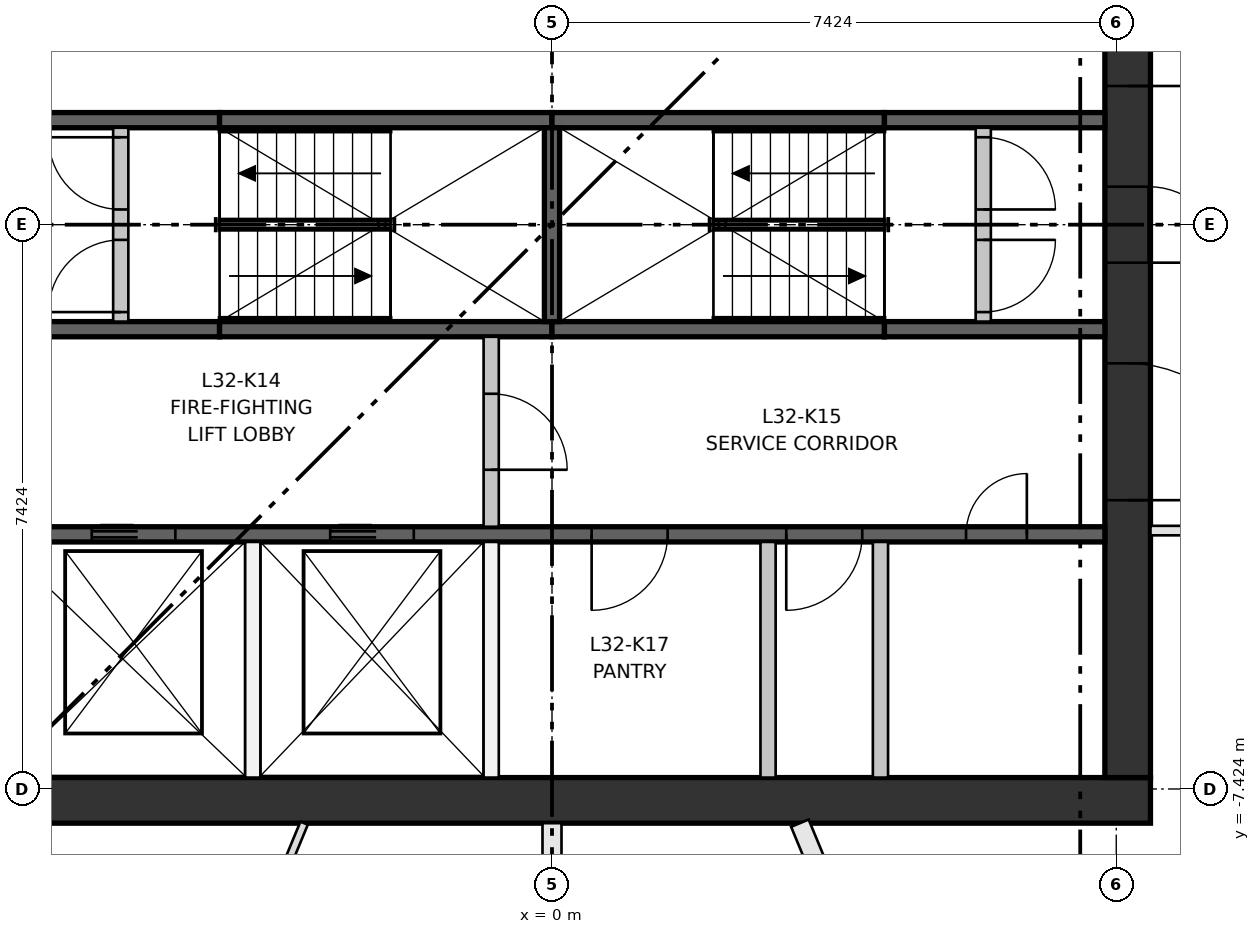
"""IFC4 building model, lengths in metres.
Left out: names, types, materials, properties, quantities, classifications, styles, units other than length and angle.
Written with IfcOpenShell. Run it as: python <this file> out.ifc"""

import sys

from ifc_helpers import new_model, si_unit, direction, frame, frame_2d, origin, place, context, subcontext, project, spatial, rectangle, extrude, element, fill, save


model = new_model("IFC4")
c1 = context("Model", 3, precision=1e-05, world=origin(), true_north=direction((0.0, 1.0)))
c2 = subcontext(c1, "Body", "Model", "MODEL_VIEW")
j1 = project(units=[si_unit("LENGTHUNIT", "METRE"), si_unit("PLANEANGLEUNIT", "RADIAN")], contexts=[c1])
p1 = place(None, origin())
s1 = spatial("IfcSite", under=j1, at=p1, CompositionType="ELEMENT")
p2 = place(p1, origin())
s2 = spatial("IfcBuilding", under=s1, at=p2, CompositionType="ELEMENT")
p3 = place(p2, frame((0.0, 0.0, 124.3)))
s3 = spatial("IfcBuildingStorey", under=s2, at=p3, CompositionType="ELEMENT", Elevation=124.3)
p4 = place(p3, frame((-7.874, -7.574, 0.0), z_axis=(0.0, 0.0, 1.0), x_axis=(1.0, 0.0, 0.0)))
e1 = element("IfcWall", 1, at=p4, inside=s3, PredefinedType="SHEAR", context=c2, shape_type="SweptSolid", body=[
    extrude(rectangle(XDim=15.748, YDim=0.6, at=frame_2d((7.874, 0.0))), origin(), (0.0, 0.0, 1.0), 3.35),
])
p5 = place(p3, frame((7.574, -7.274, 0.0), z_axis=(0.0, 0.0, 1.0), x_axis=(0.0, 1.0, 0.0)))
e2 = element("IfcWall", 2, at=p5, inside=s3, PredefinedType="SHEAR", context=c2, shape_type="SweptSolid", body=[
    extrude(rectangle(XDim=14.548, YDim=0.6, at=frame_2d((7.274, 0.0))), origin(), (0.0, 0.0, 1.0), 3.35),
])
p6 = place(p5, frame((6.774, 0.0, 0.0)))
e3 = element("IfcOpeningElement", 3, at=p6, cuts=e2, PredefinedType="OPENING", context=c2, shape_type="SweptSolid", body=[
    extrude(rectangle(XDim=1.0, YDim=2.1, at=frame_2d((0.5, 1.05))), frame((0.0, 0.31, 0.0), z_axis=(0.0, -1.0, 0.0), x_axis=(1.0, 0.0, 0.0)), (0.0, 0.0, 1.0), 0.62),
])
p7 = place(p5, frame((3.649, 0.0, 0.0)))
e4 = element("IfcOpeningElement", 4, at=p7, cuts=e2, PredefinedType="OPENING", context=c2, shape_type="SweptSolid", body=[
    extrude(rectangle(XDim=1.8, YDim=2.1, at=frame_2d((0.9, 1.05))), frame((0.0, 0.31, 0.0), z_axis=(0.0, -1.0, 0.0), x_axis=(1.0, 0.0, 0.0)), (0.0, 0.0, 1.0), 0.62),
])
p8 = place(p5, frame((9.098, 0.0, 0.0)))
e5 = element("IfcOpeningElement", 5, at=p8, cuts=e2, PredefinedType="OPENING", context=c2, shape_type="SweptSolid", body=[
    extrude(rectangle(XDim=1.8, YDim=2.1, at=frame_2d((0.9, 1.05))), frame((0.0, 0.31, 0.0), z_axis=(0.0, -1.0, 0.0), x_axis=(1.0, 0.0, 0.0)), (0.0, 0.0, 1.0), 0.62),
])
p9 = place(p3, frame((-7.274, -4.074, 0.0), z_axis=(0.0, 0.0, 1.0), x_axis=(1.0, 0.0, 0.0)))
e6 = element("IfcWall", 6, at=p9, inside=s3, PredefinedType="SHEAR", context=c2, shape_type="SweptSolid", body=[
    extrude(rectangle(XDim=14.548, YDim=0.2, at=frame_2d((7.274, 0.0))), origin(), (0.0, 0.0, 1.0), 3.0),
])
p10 = place(p9, frame((1.219, 0.0, 0.0)))
e7 = element("IfcOpeningElement", 7, at=p10, cuts=e6, PredefinedType="OPENING", context=c2, shape_type="SweptSolid", body=[
    extrude(rectangle(XDim=1.1, YDim=2.1, at=frame_2d((0.55, 1.05))), frame((0.0, 0.11, 0.0), z_axis=(0.0, -1.0, 0.0), x_axis=(1.0, 0.0, 0.0)), (0.0, 0.0, 1.0), 0.22),
])
p11 = place(p9, frame((4.355, 0.0, 0.0)))
e8 = element("IfcOpeningElement", 8, at=p11, cuts=e6, PredefinedType="OPENING", context=c2, shape_type="SweptSolid", body=[
    extrude(rectangle(XDim=1.1, YDim=2.1, at=frame_2d((0.55, 1.05))), frame((0.0, 0.11, 0.0), z_axis=(0.0, -1.0, 0.0), x_axis=(1.0, 0.0, 0.0)), (0.0, 0.0, 1.0), 0.22),
])
p12 = place(p9, frame((7.795, 0.0, 0.0)))
e9 = element("IfcOpeningElement", 9, at=p12, cuts=e6, PredefinedType="OPENING", context=c2, shape_type="SweptSolid", body=[
    extrude(rectangle(XDim=1.0, YDim=2.1, at=frame_2d((0.5, 1.05))), frame((0.0, 0.11, 0.0), z_axis=(0.0, -1.0, 0.0), x_axis=(1.0, 0.0, 0.0)), (0.0, 0.0, 1.0), 0.22),
])
p13 = place(p9, frame((10.356, 0.0, 0.0)))
e10 = element("IfcOpeningElement", 10, at=p13, cuts=e6, PredefinedType="OPENING", context=c2, shape_type="SweptSolid", body=[
    extrude(rectangle(XDim=1.0, YDim=2.1, at=frame_2d((0.5, 1.05))), frame((0.0, 0.11, 0.0), z_axis=(0.0, -1.0, 0.0), x_axis=(1.0, 0.0, 0.0)), (0.0, 0.0, 1.0), 0.22),
])
p14 = place(p9, frame((12.722, 0.0, 0.0)))
e11 = element("IfcOpeningElement", 11, at=p14, cuts=e6, PredefinedType="OPENING", context=c2, shape_type="SweptSolid", body=[
    extrude(rectangle(XDim=0.8, YDim=2.1, at=frame_2d((0.4, 1.05))), frame((0.0, 0.11, 0.0), z_axis=(0.0, -1.0, 0.0), x_axis=(1.0, 0.0, 0.0)), (0.0, 0.0, 1.0), 0.22),
])
p15 = place(p3, frame((-7.274, -1.375, 0.0), z_axis=(0.0, 0.0, 1.0), x_axis=(1.0, 0.0, 0.0)))
e12 = element("IfcWall", 12, at=p15, inside=s3, PredefinedType="SHEAR", context=c2, shape_type="SweptSolid", body=[
    extrude(rectangle(XDim=2.9, YDim=0.2, at=frame_2d((1.45, 0.0))), origin(), (0.0, 0.0, 1.0), 3.0),
])
for number, where, z_axis, x_axis in (
    (13, (-4.374, -1.375, 0.0), (0.0, 0.0, 1.0), (1.0, 0.0, 0.0)),
    (14, (0.0, -1.375, 0.0), (0.0, 0.0, 1.0), (1.0, 0.0, 0.0)),
):
    element("IfcWall", number, at=place(p3, frame(where, z_axis=z_axis, x_axis=x_axis)), inside=s3, PredefinedType="SHEAR", context=c2, shape_type="SweptSolid", body=[
        extrude(rectangle(XDim=4.374, YDim=0.2, at=frame_2d((2.187, 0.0))), origin(), (0.0, 0.0, 1.0), 3.0),
    ])
for number, where, z_axis, x_axis in (
    (15, (4.374, -1.375, 0.0), (0.0, 0.0, 1.0), (1.0, 0.0, 0.0)),
    (16, (-7.274, 1.375, 0.0), (0.0, 0.0, 1.0), (1.0, 0.0, 0.0)),
):
    element("IfcWall", number, at=place(p3, frame(where, z_axis=z_axis, x_axis=x_axis)), inside=s3, PredefinedType="SHEAR", context=c2, shape_type="SweptSolid", body=[
        extrude(rectangle(XDim=2.9, YDim=0.2, at=frame_2d((1.45, 0.0))), origin(), (0.0, 0.0, 1.0), 3.0),
    ])
for number, where, z_axis, x_axis in (
    (17, (-4.374, 1.375, 0.0), (0.0, 0.0, 1.0), (1.0, 0.0, 0.0)),
    (18, (0.0, 1.375, 0.0), (0.0, 0.0, 1.0), (1.0, 0.0, 0.0)),
):
    element("IfcWall", number, at=place(p3, frame(where, z_axis=z_axis, x_axis=x_axis)), inside=s3, PredefinedType="SHEAR", context=c2, shape_type="SweptSolid", body=[
        extrude(rectangle(XDim=4.374, YDim=0.2, at=frame_2d((2.187, 0.0))), origin(), (0.0, 0.0, 1.0), 3.0),
    ])
p16 = place(p3, frame((4.374, 1.375, 0.0), z_axis=(0.0, 0.0, 1.0), x_axis=(1.0, 0.0, 0.0)))
e19 = element("IfcWall", 19, at=p16, inside=s3, PredefinedType="SHEAR", context=c2, shape_type="SweptSolid", body=[
    extrude(rectangle(XDim=2.9, YDim=0.2, at=frame_2d((1.45, 0.0))), origin(), (0.0, 0.0, 1.0), 3.0),
])
p17 = place(p3, frame((0.0, -1.275, 0.0), z_axis=(0.0, 0.0, 1.0), x_axis=(0.0, 1.0, 0.0)))
e20 = element("IfcWall", 20, at=p17, inside=s3, PredefinedType="SHEAR", context=c2, shape_type="SweptSolid", body=[
    extrude(rectangle(XDim=2.55, YDim=0.2, at=frame_2d((1.275, 0.0))), origin(), (0.0, 0.0, 1.0), 3.0),
])
for number, where, z_axis, x_axis in (
    (21, (-3.937, -7.274, 0.0), (0.0, 0.0, 1.0), (0.0, 1.0, 0.0)),
    (22, (-0.8, -7.274, 0.0), (0.0, 0.0, 1.0), (0.0, 1.0, 0.0)),
):
    element("IfcWall", number, at=place(p3, frame(where, z_axis=z_axis, x_axis=x_axis)), inside=s3, PredefinedType="PARTITIONING", context=c2, shape_type="SweptSolid", body=[
        extrude(rectangle(XDim=3.1, YDim=0.2, at=frame_2d((1.55, 0.0))), origin(), (0.0, 0.0, 1.0), 3.0),
    ])
p18 = place(p3, frame((-0.8, -3.974, 0.0), z_axis=(0.0, 0.0, 1.0), x_axis=(0.0, 1.0, 0.0)))
e23 = element("IfcWall", 23, at=p18, inside=s3, PredefinedType="PARTITIONING", context=c2, shape_type="SweptSolid", body=[
    extrude(rectangle(XDim=2.499, YDim=0.2, at=frame_2d((1.25, 0.0))), origin(), (0.0, 0.0, 1.0), 3.0),
])
p19 = place(p18, frame((0.75, 0.0, 0.0)))
e24 = element("IfcOpeningElement", 24, at=p19, cuts=e23, PredefinedType="OPENING", context=c2, shape_type="SweptSolid", body=[
    extrude(rectangle(XDim=1.0, YDim=2.1, at=frame_2d((0.5, 1.05))), frame((0.0, 0.11, 0.0), z_axis=(0.0, -1.0, 0.0), x_axis=(1.0, 0.0, 0.0)), (0.0, 0.0, 1.0), 0.22),
])
for number, where, z_axis, x_axis in (
    (25, (2.843, -7.274, 0.0), (0.0, 0.0, 1.0), (0.0, 1.0, 0.0)),
    (26, (4.322, -7.274, 0.0), (0.0, 0.0, 1.0), (0.0, 1.0, 0.0)),
):
    element("IfcWall", number, at=place(p3, frame(where, z_axis=z_axis, x_axis=x_axis)), inside=s3, PredefinedType="PARTITIONING", context=c2, shape_type="SweptSolid", body=[
        extrude(rectangle(XDim=3.1, YDim=0.2, at=frame_2d((1.55, 0.0))), origin(), (0.0, 0.0, 1.0), 3.0),
    ])
p20 = place(p3, frame((-5.674, -1.275, 0.0), z_axis=(0.0, 0.0, 1.0), x_axis=(0.0, 1.0, 0.0)))
e27 = element("IfcWall", 27, at=p20, inside=s3, PredefinedType="PARTITIONING", context=c2, shape_type="SweptSolid", body=[
    extrude(rectangle(XDim=2.55, YDim=0.2, at=frame_2d((1.275, 0.0))), origin(), (0.0, 0.0, 1.0), 3.0),
])
p21 = place(p20, frame((0.125, 0.0, 0.0)))
e28 = element("IfcOpeningElement", 28, at=p21, cuts=e27, PredefinedType="OPENING", context=c2, shape_type="SweptSolid", body=[
    extrude(rectangle(XDim=0.95, YDim=2.1, at=frame_2d((0.475, 1.05))), frame((0.0, 0.11, 0.0), z_axis=(0.0, -1.0, 0.0), x_axis=(1.0, 0.0, 0.0)), (0.0, 0.0, 1.0), 0.22),
])
p22 = place(p20, frame((1.475, 0.0, 0.0)))
e29 = element("IfcOpeningElement", 29, at=p22, cuts=e27, PredefinedType="OPENING", context=c2, shape_type="SweptSolid", body=[
    extrude(rectangle(XDim=0.95, YDim=2.1, at=frame_2d((0.475, 1.05))), frame((0.0, 0.11, 0.0), z_axis=(0.0, -1.0, 0.0), x_axis=(1.0, 0.0, 0.0)), (0.0, 0.0, 1.0), 0.22),
])
p23 = place(p3, frame((5.674, -1.275, 0.0), z_axis=(0.0, 0.0, 1.0), x_axis=(0.0, 1.0, 0.0)))
e30 = element("IfcWall", 30, at=p23, inside=s3, PredefinedType="PARTITIONING", context=c2, shape_type="SweptSolid", body=[
    extrude(rectangle(XDim=2.55, YDim=0.2, at=frame_2d((1.275, 0.0))), origin(), (0.0, 0.0, 1.0), 3.0),
])
p24 = place(p23, frame((0.125, 0.0, 0.0)))
e31 = element("IfcOpeningElement", 31, at=p24, cuts=e30, PredefinedType="OPENING", context=c2, shape_type="SweptSolid", body=[
    extrude(rectangle(XDim=0.95, YDim=2.1, at=frame_2d((0.475, 1.05))), frame((0.0, 0.11, 0.0), z_axis=(0.0, -1.0, 0.0), x_axis=(1.0, 0.0, 0.0)), (0.0, 0.0, 1.0), 0.22),
])
p25 = place(p23, frame((1.475, 0.0, 0.0)))
e32 = element("IfcOpeningElement", 32, at=p25, cuts=e30, PredefinedType="OPENING", context=c2, shape_type="SweptSolid", body=[
    extrude(rectangle(XDim=0.95, YDim=2.1, at=frame_2d((0.475, 1.05))), frame((0.0, 0.11, 0.0), z_axis=(0.0, -1.0, 0.0), x_axis=(1.0, 0.0, 0.0)), (0.0, 0.0, 1.0), 0.22),
])
p26 = place(p3, frame((13.258, -4.024, 0.0), z_axis=(0.0, 0.0, 1.0), x_axis=(-1.0, 0.0, 0.0)))
e33 = element("IfcWall", 33, at=p26, inside=s3, PredefinedType="PARTITIONING", context=c2, shape_type="SweptSolid", body=[
    extrude(rectangle(XDim=5.384, YDim=0.125, at=frame_2d((2.692, 0.0))), origin(), (0.0, 0.0, 1.0), 3.0),
])
p27 = place(p26, frame((1.8, 0.0, 0.0)))
e34 = element("IfcOpeningElement", 34, at=p27, cuts=e33, PredefinedType="OPENING", context=c2, shape_type="SweptSolid", body=[
    extrude(rectangle(XDim=1.8, YDim=2.1, at=frame_2d((0.9, 1.05))), frame((0.0, 0.073, 0.0), z_axis=(0.0, -1.0, 0.0), x_axis=(1.0, 0.0, 0.0)), (0.0, 0.0, 1.0), 0.145),
])
p28 = place(p3, frame((-3.261, -7.874, 0.0), z_axis=(0.0, 0.0, 1.0), x_axis=(-0.382671840259, -0.923884334034, 0.0)))
e35 = element("IfcWall", 35, at=p28, inside=s3, PredefinedType="PARTITIONING", context=c2, shape_type="SweptSolid", body=[
    extrude(rectangle(XDim=6.737, YDim=0.105, at=frame_2d((3.369, 0.0))), origin(), (0.0, 0.0, 1.0), 3.0),
])
p29 = place(p3, frame((0.0, -7.874, 0.0), z_axis=(0.0, 0.0, 1.0), x_axis=(0.0, -1.0, 0.0)))
e36 = element("IfcWall", 36, at=p29, inside=s3, PredefinedType="PARTITIONING", context=c2, shape_type="SweptSolid", body=[
    extrude(rectangle(XDim=7.255, YDim=0.25, at=frame_2d((3.627, 0.0))), origin(), (0.0, 0.0, 1.0), 3.0),
])
p30 = place(p3, frame((5.84, -14.098, 0.0), z_axis=(0.0, 0.0, 1.0), x_axis=(-0.382671840259, 0.923884334034, 0.0)))
e37 = element("IfcWall", 37, at=p30, inside=s3, PredefinedType="PARTITIONING", context=c2, shape_type="SweptSolid", body=[
    extrude(rectangle(XDim=6.737, YDim=0.25, at=frame_2d((3.369, 0.0))), origin(), (0.0, 0.0, 1.0), 3.0),
])
p31 = place(p30, frame((2.9, 0.0, 0.0)))
e38 = element("IfcOpeningElement", 38, at=p31, cuts=e37, PredefinedType="OPENING", context=c2, shape_type="SweptSolid", body=[
    extrude(rectangle(XDim=1.0, YDim=2.1, at=frame_2d((0.5, 1.05))), frame((0.0, 0.135, 0.0), z_axis=(0.0, -1.0, 0.0), x_axis=(1.0, 0.0, 0.0)), (0.0, 0.0, 1.0), 0.27),
])
p32 = place(p10, origin())
e39 = element("IfcDoor", 39, at=p32, inside=s3, OperationType="DOUBLE_DOOR_SLIDING", PredefinedType="DOOR", context=c2, shape_type="SweptSolid", body=[
    extrude(rectangle(XDim=1.1, YDim=2.1, at=frame_2d((0.55, 1.05))), frame((0.0, 0.025, 0.0), z_axis=(0.0, -1.0, 0.0), x_axis=(1.0, 0.0, 0.0)), (0.0, 0.0, 1.0), 0.05),
])
fill(e7, e39)
p33 = place(p11, origin())
e40 = element("IfcDoor", 40, at=p33, inside=s3, OperationType="DOUBLE_DOOR_SLIDING", PredefinedType="DOOR", context=c2, shape_type="SweptSolid", body=[
    extrude(rectangle(XDim=1.1, YDim=2.1, at=frame_2d((0.55, 1.05))), frame((0.0, 0.025, 0.0), z_axis=(0.0, -1.0, 0.0), x_axis=(1.0, 0.0, 0.0)), (0.0, 0.0, 1.0), 0.05),
])
fill(e8, e40)
p34 = place(p21, origin())
e41 = element("IfcDoor", 41, at=p34, inside=s3, OperationType="SINGLE_SWING_LEFT", PredefinedType="DOOR", context=c2, shape_type="SweptSolid", body=[
    extrude(rectangle(XDim=0.95, YDim=2.1, at=frame_2d((0.475, 1.05))), frame((0.0, 0.025, 0.0), z_axis=(0.0, -1.0, 0.0), x_axis=(1.0, 0.0, 0.0)), (0.0, 0.0, 1.0), 0.05),
])
fill(e28, e41)
p35 = place(p22, origin())
e42 = element("IfcDoor", 42, at=p35, inside=s3, OperationType="SINGLE_SWING_RIGHT", PredefinedType="DOOR", context=c2, shape_type="SweptSolid", body=[
    extrude(rectangle(XDim=0.95, YDim=2.1, at=frame_2d((0.475, 1.05))), frame((0.0, 0.025, 0.0), z_axis=(0.0, -1.0, 0.0), x_axis=(1.0, 0.0, 0.0)), (0.0, 0.0, 1.0), 0.05),
])
fill(e29, e42)
p36 = place(p24, frame((0.95, 0.0, 0.0), z_axis=(0.0, 0.0, 1.0), x_axis=(-1.0, 0.0, 0.0)))
e43 = element("IfcDoor", 43, at=p36, inside=s3, OperationType="SINGLE_SWING_RIGHT", PredefinedType="DOOR", context=c2, shape_type="SweptSolid", body=[
    extrude(rectangle(XDim=0.95, YDim=2.1, at=frame_2d((0.475, 1.05))), frame((0.0, 0.025, 0.0), z_axis=(0.0, -1.0, 0.0), x_axis=(1.0, 0.0, 0.0)), (0.0, 0.0, 1.0), 0.05),
])
fill(e31, e43)
p37 = place(p25, frame((0.95, 0.0, 0.0), z_axis=(0.0, 0.0, 1.0), x_axis=(-1.0, 0.0, 0.0)))
e44 = element("IfcDoor", 44, at=p37, inside=s3, OperationType="SINGLE_SWING_LEFT", PredefinedType="DOOR", context=c2, shape_type="SweptSolid", body=[
    extrude(rectangle(XDim=0.95, YDim=2.1, at=frame_2d((0.475, 1.05))), frame((0.0, 0.025, 0.0), z_axis=(0.0, -1.0, 0.0), x_axis=(1.0, 0.0, 0.0)), (0.0, 0.0, 1.0), 0.05),
])
fill(e32, e44)
p38 = place(p19, frame((1.0, 0.0, 0.0), z_axis=(0.0, 0.0, 1.0), x_axis=(-1.0, 0.0, 0.0)))
e45 = element("IfcDoor", 45, at=p38, inside=s3, OperationType="SINGLE_SWING_LEFT", PredefinedType="DOOR", context=c2, shape_type="SweptSolid", body=[
    extrude(rectangle(XDim=1.0, YDim=2.1, at=frame_2d((0.5, 1.05))), frame((0.0, 0.025, 0.0), z_axis=(0.0, -1.0, 0.0), x_axis=(1.0, 0.0, 0.0)), (0.0, 0.0, 1.0), 0.05),
])
fill(e24, e45)
p39 = place(p12, frame((1.0, 0.0, 0.0), z_axis=(0.0, 0.0, 1.0), x_axis=(-1.0, 0.0, 0.0)))
e46 = element("IfcDoor", 46, at=p39, inside=s3, OperationType="SINGLE_SWING_LEFT", PredefinedType="DOOR", context=c2, shape_type="SweptSolid", body=[
    extrude(rectangle(XDim=1.0, YDim=2.1, at=frame_2d((0.5, 1.05))), frame((0.0, 0.025, 0.0), z_axis=(0.0, -1.0, 0.0), x_axis=(1.0, 0.0, 0.0)), (0.0, 0.0, 1.0), 0.05),
])
fill(e9, e46)
p40 = place(p13, frame((1.0, 0.0, 0.0), z_axis=(0.0, 0.0, 1.0), x_axis=(-1.0, 0.0, 0.0)))
e47 = element("IfcDoor", 47, at=p40, inside=s3, OperationType="SINGLE_SWING_LEFT", PredefinedType="DOOR", context=c2, shape_type="SweptSolid", body=[
    extrude(rectangle(XDim=1.0, YDim=2.1, at=frame_2d((0.5, 1.05))), frame((0.0, 0.025, 0.0), z_axis=(0.0, -1.0, 0.0), x_axis=(1.0, 0.0, 0.0)), (0.0, 0.0, 1.0), 0.05),
])
fill(e10, e47)
p41 = place(p14, origin())
e48 = element("IfcDoor", 48, at=p41, inside=s3, OperationType="SINGLE_SWING_RIGHT", PredefinedType="DOOR", context=c2, shape_type="SweptSolid", body=[
    extrude(rectangle(XDim=0.8, YDim=2.1, at=frame_2d((0.4, 1.05))), frame((0.0, 0.025, 0.0), z_axis=(0.0, -1.0, 0.0), x_axis=(1.0, 0.0, 0.0)), (0.0, 0.0, 1.0), 0.05),
])
fill(e11, e48)
p42 = place(p6, frame((1.0, 0.0, 0.0), z_axis=(0.0, 0.0, 1.0), x_axis=(-1.0, 0.0, 0.0)))
e49 = element("IfcDoor", 49, at=p42, inside=s3, OperationType="SINGLE_SWING_LEFT", PredefinedType="DOOR", context=c2, shape_type="SweptSolid", body=[
    extrude(rectangle(XDim=1.0, YDim=2.1, at=frame_2d((0.5, 1.05))), frame((0.0, 0.3, 0.0), z_axis=(0.0, -1.0, 0.0), x_axis=(1.0, 0.0, 0.0)), (0.0, 0.0, 1.0), 0.05),
])
fill(e3, e49)
p43 = place(p7, frame((1.8, 0.0, 0.0), z_axis=(0.0, 0.0, 1.0), x_axis=(-1.0, 0.0, 0.0)))
e50 = element("IfcDoor", 50, at=p43, inside=s3, OperationType="DOUBLE_DOOR_SINGLE_SWING", PredefinedType="DOOR", context=c2, shape_type="SweptSolid", body=[
    extrude(rectangle(XDim=1.8, YDim=2.1, at=frame_2d((0.9, 1.05))), frame((0.0, 0.025, 0.0), z_axis=(0.0, -1.0, 0.0), x_axis=(1.0, 0.0, 0.0)), (0.0, 0.0, 1.0), 0.05),
])
fill(e4, e50)
p44 = place(p8, frame((1.8, 0.0, 0.0), z_axis=(0.0, 0.0, 1.0), x_axis=(-1.0, 0.0, 0.0)))
e51 = element("IfcDoor", 51, at=p44, inside=s3, OperationType="DOUBLE_DOOR_SINGLE_SWING", PredefinedType="DOOR", context=c2, shape_type="SweptSolid", body=[
    extrude(rectangle(XDim=1.8, YDim=2.1, at=frame_2d((0.9, 1.05))), frame((0.0, 0.025, 0.0), z_axis=(0.0, -1.0, 0.0), x_axis=(1.0, 0.0, 0.0)), (0.0, 0.0, 1.0), 0.05),
])
fill(e5, e51)
save(model, sys.argv[1])
